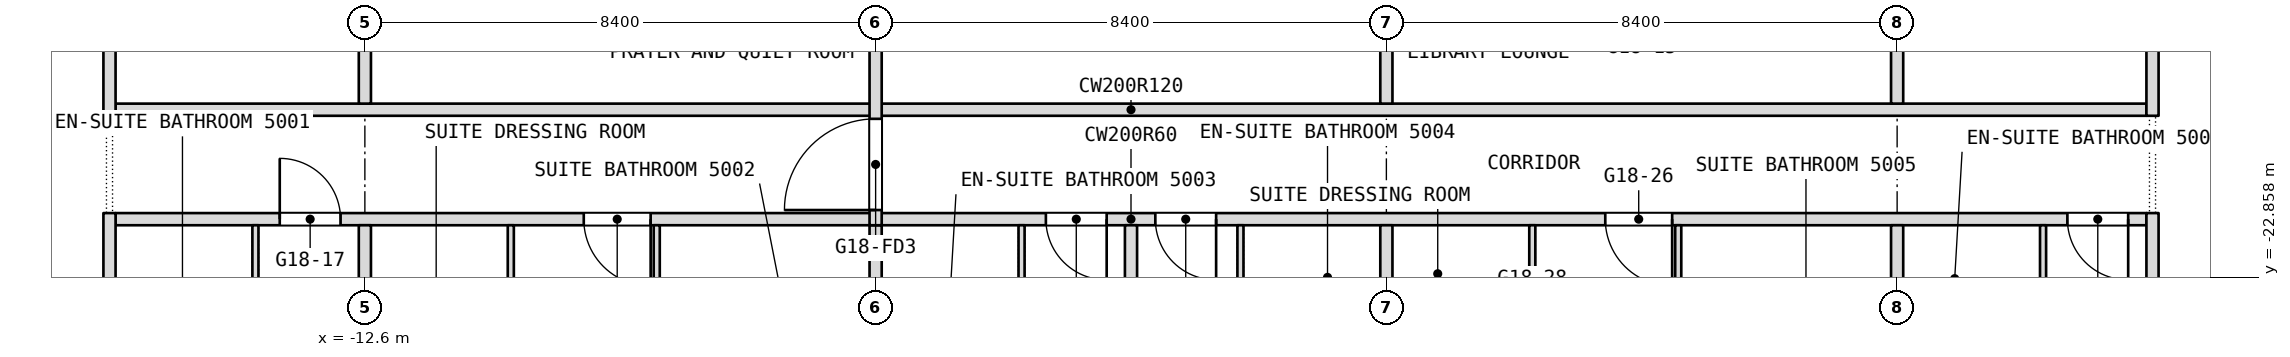
"""IFC4 building model, lengths in metres.
Left out: names, types, materials, properties, quantities, classifications, styles, units other than length and angle.
Written with IfcOpenShell. Run it as: python <this file> out.ifc"""

import sys

from ifc_helpers import new_model, si_unit, direction, frame, frame_2d, origin, place, context, subcontext, project, spatial, rectangle, extrude, element, fill, save


model = new_model("IFC4")
c1 = context("Model", 3, precision=1e-05, world=origin(), true_north=direction((0.0, 1.0)))
c2 = subcontext(c1, "Body", "Model", "MODEL_VIEW")
j1 = project(units=[si_unit("LENGTHUNIT", "METRE"), si_unit("PLANEANGLEUNIT", "RADIAN")], contexts=[c1])
p1 = place(None, origin())
s1 = spatial("IfcSite", under=j1, at=p1, CompositionType="ELEMENT")
p2 = place(p1, origin())
s2 = spatial("IfcBuilding", under=s1, at=p2, CompositionType="ELEMENT")
p3 = place(p2, frame((0.0, 0.0, 216.5)))
s3 = spatial("IfcBuildingStorey", under=s2, at=p3, CompositionType="ELEMENT", Elevation=216.5)
p4 = place(p3, frame((-16.7, -21.9, 0.0), z_axis=(0.0, 0.0, 1.0), x_axis=(1.0, 0.0, 0.0)))
e1 = element("IfcWall", 1, at=p4, inside=s3, PredefinedType="PARTITIONING", context=c2, shape_type="SweptSolid", body=[
    extrude(rectangle(XDim=33.4, YDim=0.2, at=frame_2d((16.7, 0.0))), origin(), (0.0, 0.0, 1.0), 3.34),
])
p5 = place(p4, frame((2.7, 0.0, 0.0)))
e2 = element("IfcOpeningElement", 2, at=p5, cuts=e1, PredefinedType="OPENING", context=c2, shape_type="SweptSolid", body=[
    extrude(rectangle(XDim=1.0, YDim=2.1, at=frame_2d((0.5, 1.05))), frame((0.0, 0.1, 0.0), z_axis=(0.0, -1.0, 0.0), x_axis=(1.0, 0.0, 0.0)), (0.0, 0.0, 1.0), 0.2),
])
p6 = place(p4, frame((7.7, 0.0, 0.0)))
e3 = element("IfcOpeningElement", 3, at=p6, cuts=e1, PredefinedType="OPENING", context=c2, shape_type="SweptSolid", body=[
    extrude(rectangle(XDim=1.1, YDim=2.1, at=frame_2d((0.55, 1.05))), frame((0.0, 0.1, 0.0), z_axis=(0.0, -1.0, 0.0), x_axis=(1.0, 0.0, 0.0)), (0.0, 0.0, 1.0), 0.2),
])
p7 = place(p4, frame((15.3, 0.0, 0.0)))
e4 = element("IfcOpeningElement", 4, at=p7, cuts=e1, PredefinedType="OPENING", context=c2, shape_type="SweptSolid", body=[
    extrude(rectangle(XDim=1.0, YDim=2.1, at=frame_2d((0.5, 1.05))), frame((0.0, 0.1, 0.0), z_axis=(0.0, -1.0, 0.0), x_axis=(1.0, 0.0, 0.0)), (0.0, 0.0, 1.0), 0.2),
])
p8 = place(p4, frame((17.1, 0.0, 0.0)))
e5 = element("IfcOpeningElement", 5, at=p8, cuts=e1, PredefinedType="OPENING", context=c2, shape_type="SweptSolid", body=[
    extrude(rectangle(XDim=1.0, YDim=2.1, at=frame_2d((0.5, 1.05))), frame((0.0, 0.1, 0.0), z_axis=(0.0, -1.0, 0.0), x_axis=(1.0, 0.0, 0.0)), (0.0, 0.0, 1.0), 0.2),
])
p9 = place(p4, frame((24.5, 0.0, 0.0)))
e6 = element("IfcOpeningElement", 6, at=p9, cuts=e1, PredefinedType="OPENING", context=c2, shape_type="SweptSolid", body=[
    extrude(rectangle(XDim=1.1, YDim=2.1, at=frame_2d((0.55, 1.05))), frame((0.0, 0.1, 0.0), z_axis=(0.0, -1.0, 0.0), x_axis=(1.0, 0.0, 0.0)), (0.0, 0.0, 1.0), 0.2),
])
p10 = place(p4, frame((32.1, 0.0, 0.0)))
e7 = element("IfcOpeningElement", 7, at=p10, cuts=e1, PredefinedType="OPENING", context=c2, shape_type="SweptSolid", body=[
    extrude(rectangle(XDim=1.0, YDim=2.1, at=frame_2d((0.5, 1.05))), frame((0.0, 0.1, 0.0), z_axis=(0.0, -1.0, 0.0), x_axis=(1.0, 0.0, 0.0)), (0.0, 0.0, 1.0), 0.2),
])
p11 = place(p3, frame((-16.7, -20.1, 0.0), z_axis=(0.0, 0.0, 1.0), x_axis=(1.0, 0.0, 0.0)))
e8 = element("IfcWall", 8, at=p11, inside=s3, PredefinedType="PARTITIONING", context=c2, shape_type="SweptSolid", body=[
    extrude(rectangle(XDim=33.4, YDim=0.2, at=frame_2d((16.7, 0.0))), origin(), (0.0, 0.0, 1.0), 3.34),
])
p12 = place(p3, frame((16.8, -27.229, 0.0), z_axis=(0.0, 0.0, 1.0), x_axis=(0.0, 1.0, 0.0)))
e9 = element("IfcWall", 9, at=p12, inside=s3, PredefinedType="PARTITIONING", context=c2, shape_type="SweptSolid", body=[
    extrude(rectangle(XDim=5.429, YDim=0.2, at=frame_2d((2.714, 0.0))), origin(), (0.0, 0.0, 1.0), 3.34),
])
p13 = place(p3, frame((16.8, -20.2, 0.0), z_axis=(0.0, 0.0, 1.0), x_axis=(0.0, 1.0, 0.0)))
e10 = element("IfcWall", 10, at=p13, inside=s3, PredefinedType="PARTITIONING", context=c2, shape_type="SweptSolid", body=[
    extrude(rectangle(XDim=6.8, YDim=0.2, at=frame_2d((3.4, 0.0))), origin(), (0.0, 0.0, 1.0), 3.34),
])
p14 = place(p3, frame((15.0, -24.65, 0.0), z_axis=(0.0, 0.0, 1.0), x_axis=(0.0, 1.0, 0.0)))
e11 = element("IfcWall", 11, at=p14, inside=s3, PredefinedType="PARTITIONING", context=c2, shape_type="SweptSolid", body=[
    extrude(rectangle(XDim=2.65, YDim=0.1, at=frame_2d((1.325, 0.0))), origin(), (0.0, 0.0, 1.0), 3.34),
])
p15 = place(p3, frame((12.6, -28.343, 0.0), z_axis=(0.0, 0.0, 1.0), x_axis=(0.0, 1.0, 0.0)))
e12 = element("IfcWall", 12, at=p15, inside=s3, PredefinedType="PARTITIONING", context=c2, shape_type="SweptSolid", body=[
    extrude(rectangle(XDim=6.343, YDim=0.2, at=frame_2d((3.171, 0.0))), origin(), (0.0, 0.0, 1.0), 3.34),
])
p16 = place(p3, frame((12.6, -20.0, 0.0), z_axis=(0.0, 0.0, 1.0), x_axis=(0.0, 1.0, 0.0)))
e13 = element("IfcWall", 13, at=p16, inside=s3, PredefinedType="PARTITIONING", context=c2, shape_type="SweptSolid", body=[
    extrude(rectangle(XDim=1.5, YDim=0.2, at=frame_2d((0.75, 0.0))), origin(), (0.0, 0.0, 1.0), 3.34),
])
p17 = place(p3, frame((9.0, -25.55, 0.0), z_axis=(0.0, 0.0, 1.0), x_axis=(0.0, 1.0, 0.0)))
e14 = element("IfcWall", 14, at=p17, inside=s3, PredefinedType="PARTITIONING", context=c2, shape_type="SweptSolid", body=[
    extrude(rectangle(XDim=3.55, YDim=0.1, at=frame_2d((1.775, 0.0))), origin(), (0.0, 0.0, 1.0), 3.34),
])
p18 = place(p3, frame((6.6, -25.45, 0.0), z_axis=(0.0, 0.0, 1.0), x_axis=(0.0, 1.0, 0.0)))
e15 = element("IfcWall", 15, at=p18, inside=s3, PredefinedType="PARTITIONING", context=c2, shape_type="SweptSolid", body=[
    extrude(rectangle(XDim=3.45, YDim=0.1, at=frame_2d((1.725, 0.0))), origin(), (0.0, 0.0, 1.0), 3.34),
])
p19 = place(p18, frame((1.12, 0.0, 0.0)))
e16 = element("IfcOpeningElement", 16, at=p19, cuts=e15, PredefinedType="OPENING", context=c2, shape_type="SweptSolid", body=[
    extrude(rectangle(XDim=0.9, YDim=2.1, at=frame_2d((0.45, 1.05))), frame((0.0, 0.05, 0.0), z_axis=(0.0, -1.0, 0.0), x_axis=(1.0, 0.0, 0.0)), (0.0, 0.0, 1.0), 0.1),
])
p20 = place(p3, frame((4.2, -28.9, 0.0), z_axis=(0.0, 0.0, 1.0), x_axis=(0.0, 1.0, 0.0)))
e17 = element("IfcWall", 17, at=p20, inside=s3, PredefinedType="PARTITIONING", context=c2, shape_type="SweptSolid", body=[
    extrude(rectangle(XDim=6.9, YDim=0.2, at=frame_2d((3.45, 0.0))), origin(), (0.0, 0.0, 1.0), 3.34),
])
p21 = place(p3, frame((4.2, -20.0, 0.0), z_axis=(0.0, 0.0, 1.0), x_axis=(0.0, 1.0, 0.0)))
e18 = element("IfcWall", 18, at=p21, inside=s3, PredefinedType="PARTITIONING", context=c2, shape_type="SweptSolid", body=[
    extrude(rectangle(XDim=6.4, YDim=0.2, at=frame_2d((3.2, 0.0))), origin(), (0.0, 0.0, 1.0), 3.34),
])
p22 = place(p3, frame((1.8, -24.75, 0.0), z_axis=(0.0, 0.0, 1.0), x_axis=(0.0, 1.0, 0.0)))
e19 = element("IfcWall", 19, at=p22, inside=s3, PredefinedType="PARTITIONING", context=c2, shape_type="SweptSolid", body=[
    extrude(rectangle(XDim=2.75, YDim=0.1, at=frame_2d((1.375, 0.0))), origin(), (0.0, 0.0, 1.0), 3.34),
])
p23 = place(p3, frame((0.0, -28.9, 0.0), z_axis=(0.0, 0.0, 1.0), x_axis=(0.0, 1.0, 0.0)))
e20 = element("IfcWall", 20, at=p23, inside=s3, PredefinedType="PARTITIONING", context=c2, shape_type="SweptSolid", body=[
    extrude(rectangle(XDim=6.9, YDim=0.2, at=frame_2d((3.45, 0.0))), origin(), (0.0, 0.0, 1.0), 3.34),
])
p24 = place(p3, frame((-1.8, -25.75, 0.0), z_axis=(0.0, 0.0, 1.0), x_axis=(0.0, 1.0, 0.0)))
e21 = element("IfcWall", 21, at=p24, inside=s3, PredefinedType="PARTITIONING", context=c2, shape_type="SweptSolid", body=[
    extrude(rectangle(XDim=3.75, YDim=0.1, at=frame_2d((1.875, 0.0))), origin(), (0.0, 0.0, 1.0), 3.34),
])
p25 = place(p3, frame((-4.2, -28.9, 0.0), z_axis=(0.0, 0.0, 1.0), x_axis=(0.0, 1.0, 0.0)))
e22 = element("IfcWall", 22, at=p25, inside=s3, PredefinedType="PARTITIONING", context=c2, shape_type="SweptSolid", body=[
    extrude(rectangle(XDim=6.9, YDim=0.2, at=frame_2d((3.45, 0.0))), origin(), (0.0, 0.0, 1.0), 3.34),
])
p26 = place(p3, frame((-4.2, -22.0, 0.0), z_axis=(0.0, 0.0, 1.0), x_axis=(0.0, 1.0, 0.0)))
e23 = element("IfcWall", 23, at=p26, inside=s3, PredefinedType="PARTITIONING", context=c2, shape_type="SweptSolid", body=[
    extrude(rectangle(XDim=8.4, YDim=0.2, at=frame_2d((4.2, 0.0))), origin(), (0.0, 0.0, 1.0), 3.34),
])
p27 = place(p26, frame((0.25, 0.0, 0.0)))
e24 = element("IfcOpeningElement", 24, at=p27, cuts=e23, PredefinedType="OPENING", context=c2, shape_type="SweptSolid", body=[
    extrude(rectangle(XDim=1.5, YDim=2.1, at=frame_2d((0.75, 1.05))), frame((0.0, 0.1, 0.0), z_axis=(0.0, -1.0, 0.0), x_axis=(1.0, 0.0, 0.0)), (0.0, 0.0, 1.0), 0.2),
])
p28 = place(p3, frame((-7.8, -25.55, 0.0), z_axis=(0.0, 0.0, 1.0), x_axis=(0.0, 1.0, 0.0)))
e25 = element("IfcWall", 25, at=p28, inside=s3, PredefinedType="PARTITIONING", context=c2, shape_type="SweptSolid", body=[
    extrude(rectangle(XDim=3.55, YDim=0.1, at=frame_2d((1.775, 0.0))), origin(), (0.0, 0.0, 1.0), 3.34),
])
p29 = place(p3, frame((-10.2, -25.45, 0.0), z_axis=(0.0, 0.0, 1.0), x_axis=(0.0, 1.0, 0.0)))
e26 = element("IfcWall", 26, at=p29, inside=s3, PredefinedType="PARTITIONING", context=c2, shape_type="SweptSolid", body=[
    extrude(rectangle(XDim=3.45, YDim=0.1, at=frame_2d((1.725, 0.0))), origin(), (0.0, 0.0, 1.0), 3.34),
])
p30 = place(p3, frame((-12.6, -28.343, 0.0), z_axis=(0.0, 0.0, 1.0), x_axis=(0.0, 1.0, 0.0)))
e27 = element("IfcWall", 27, at=p30, inside=s3, PredefinedType="PARTITIONING", context=c2, shape_type="SweptSolid", body=[
    extrude(rectangle(XDim=6.343, YDim=0.2, at=frame_2d((3.171, 0.0))), origin(), (0.0, 0.0, 1.0), 3.34),
])
p31 = place(p3, frame((-12.6, -20.0, 0.0), z_axis=(0.0, 0.0, 1.0), x_axis=(0.0, 1.0, 0.0)))
e28 = element("IfcWall", 28, at=p31, inside=s3, PredefinedType="PARTITIONING", context=c2, shape_type="SweptSolid", body=[
    extrude(rectangle(XDim=1.5, YDim=0.2, at=frame_2d((0.75, 0.0))), origin(), (0.0, 0.0, 1.0), 3.34),
])
p32 = place(p3, frame((-14.4, -25.75, 0.0), z_axis=(0.0, 0.0, 1.0), x_axis=(0.0, 1.0, 0.0)))
e29 = element("IfcWall", 29, at=p32, inside=s3, PredefinedType="PARTITIONING", context=c2, shape_type="SweptSolid", body=[
    extrude(rectangle(XDim=3.75, YDim=0.1, at=frame_2d((1.875, 0.0))), origin(), (0.0, 0.0, 1.0), 3.34),
])
p33 = place(p3, frame((-16.8, -27.229, 0.0), z_axis=(0.0, 0.0, 1.0), x_axis=(0.0, 1.0, 0.0)))
e30 = element("IfcWall", 30, at=p33, inside=s3, PredefinedType="PARTITIONING", context=c2, shape_type="SweptSolid", body=[
    extrude(rectangle(XDim=5.429, YDim=0.2, at=frame_2d((2.714, 0.0))), origin(), (0.0, 0.0, 1.0), 3.34),
])
p34 = place(p3, frame((-16.8, -20.2, 0.0), z_axis=(0.0, 0.0, 1.0), x_axis=(0.0, 1.0, 0.0)))
e31 = element("IfcWall", 31, at=p34, inside=s3, PredefinedType="PARTITIONING", context=c2, shape_type="SweptSolid", body=[
    extrude(rectangle(XDim=6.8, YDim=0.2, at=frame_2d((3.4, 0.0))), origin(), (0.0, 0.0, 1.0), 3.34),
])
p35 = place(p5, origin())
e32 = element("IfcDoor", 32, at=p35, inside=s3, OperationType="SINGLE_SWING_LEFT", PredefinedType="DOOR", context=c2, shape_type="SweptSolid", body=[
    extrude(rectangle(XDim=1.0, YDim=2.1, at=frame_2d((0.5, 1.05))), frame((0.0, 0.025, 0.0), z_axis=(0.0, -1.0, 0.0), x_axis=(1.0, 0.0, 0.0)), (0.0, 0.0, 1.0), 0.05),
])
fill(e2, e32)
p36 = place(p6, origin())
e33 = element("IfcDoor", 33, at=p36, inside=s3, OperationType="SINGLE_SWING_LEFT", PredefinedType="DOOR", context=c2, shape_type="SweptSolid", body=[
    extrude(rectangle(XDim=1.1, YDim=2.1, at=frame_2d((0.55, 1.05))), frame((0.0, 0.025, 0.0), z_axis=(0.0, -1.0, 0.0), x_axis=(1.0, 0.0, 0.0)), (0.0, 0.0, 1.0), 0.05),
])
fill(e3, e33)
p37 = place(p7, origin())
e34 = element("IfcDoor", 34, at=p37, inside=s3, OperationType="SINGLE_SWING_RIGHT", PredefinedType="DOOR", context=c2, shape_type="SweptSolid", body=[
    extrude(rectangle(XDim=1.0, YDim=2.1, at=frame_2d((0.5, 1.05))), frame((0.0, 0.025, 0.0), z_axis=(0.0, -1.0, 0.0), x_axis=(1.0, 0.0, 0.0)), (0.0, 0.0, 1.0), 0.05),
])
fill(e4, e34)
p38 = place(p8, origin())
e35 = element("IfcDoor", 35, at=p38, inside=s3, OperationType="SINGLE_SWING_RIGHT", PredefinedType="DOOR", context=c2, shape_type="SweptSolid", body=[
    extrude(rectangle(XDim=1.0, YDim=2.1, at=frame_2d((0.5, 1.05))), frame((0.0, 0.025, 0.0), z_axis=(0.0, -1.0, 0.0), x_axis=(1.0, 0.0, 0.0)), (0.0, 0.0, 1.0), 0.05),
])
fill(e5, e35)
p39 = place(p9, origin())
e36 = element("IfcDoor", 36, at=p39, inside=s3, OperationType="SINGLE_SWING_LEFT", PredefinedType="DOOR", context=c2, shape_type="SweptSolid", body=[
    extrude(rectangle(XDim=1.1, YDim=2.1, at=frame_2d((0.55, 1.05))), frame((0.0, 0.025, 0.0), z_axis=(0.0, -1.0, 0.0), x_axis=(1.0, 0.0, 0.0)), (0.0, 0.0, 1.0), 0.05),
])
fill(e6, e36)
p40 = place(p10, origin())
e37 = element("IfcDoor", 37, at=p40, inside=s3, OperationType="SINGLE_SWING_LEFT", PredefinedType="DOOR", context=c2, shape_type="SweptSolid", body=[
    extrude(rectangle(XDim=1.0, YDim=2.1, at=frame_2d((0.5, 1.05))), frame((0.0, 0.025, 0.0), z_axis=(0.0, -1.0, 0.0), x_axis=(1.0, 0.0, 0.0)), (0.0, 0.0, 1.0), 0.05),
])
fill(e7, e37)
p41 = place(p27, origin())
e38 = element("IfcDoor", 38, at=p41, inside=s3, OperationType="DOUBLE_DOOR_DOUBLE_SWING", PredefinedType="DOOR", context=c2, shape_type="SweptSolid", body=[
    extrude(rectangle(XDim=1.5, YDim=2.1, at=frame_2d((0.75, 1.05))), frame((0.0, 0.025, 0.0), z_axis=(0.0, -1.0, 0.0), x_axis=(1.0, 0.0, 0.0)), (0.0, 0.0, 1.0), 0.05),
])
fill(e24, e38)
save(model, sys.argv[1])
